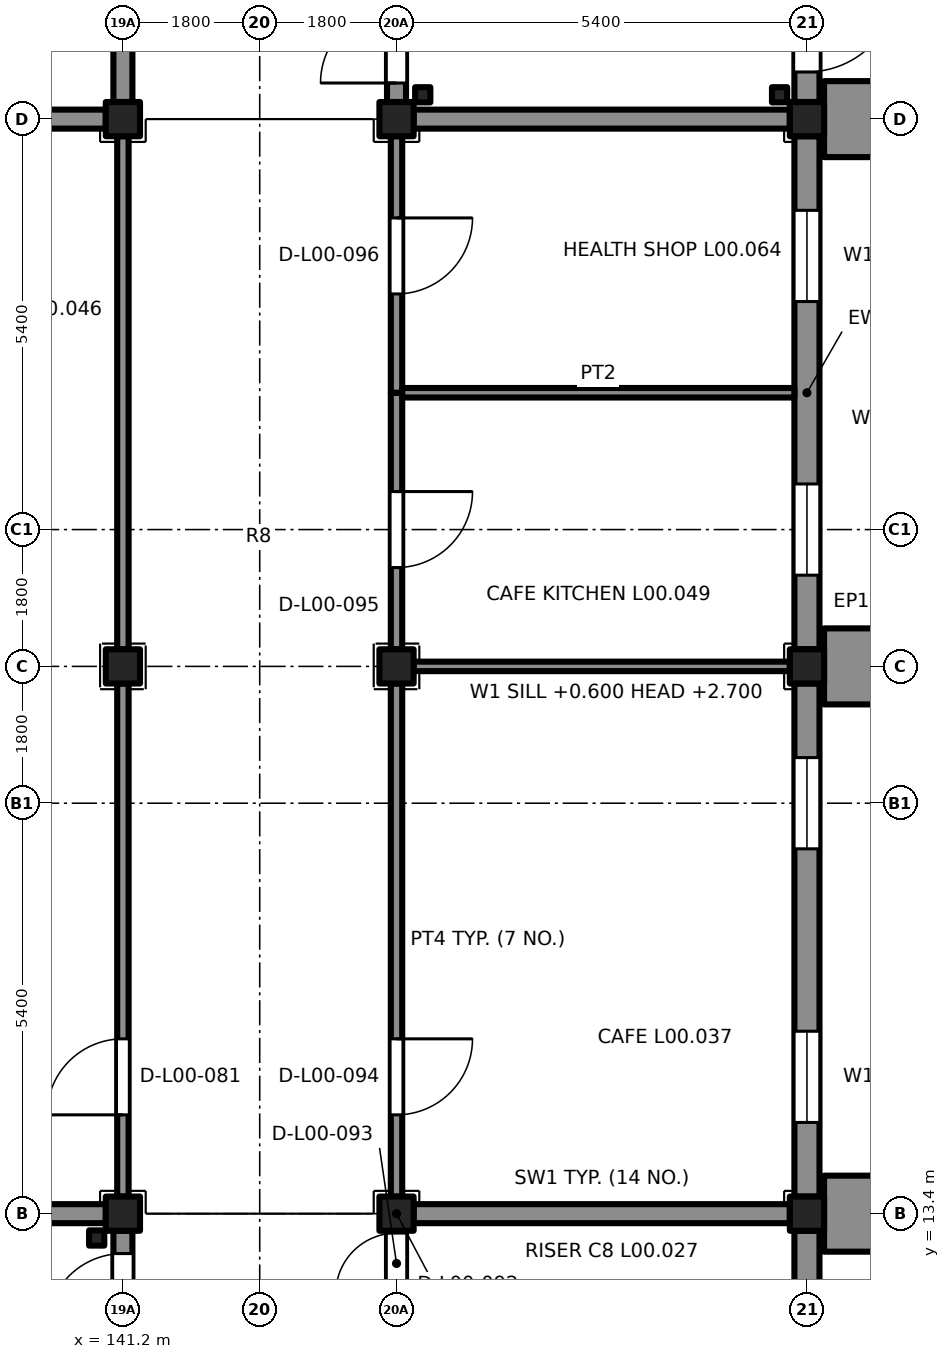
"""IFC4 building model, lengths in metres.
Left out: names, types, materials, properties, quantities, classifications, styles, units other than length and angle.
Written with IfcOpenShell. Run it as: python <this file> out.ifc"""

import sys

from ifc_helpers import new_model, si_unit, direction, frame, frame_2d, origin, origin_2d, place, context, subcontext, project, spatial, rectangle, extrude, element, fill, save


model = new_model("IFC4")
c1 = context("Model", 3, precision=1e-05, world=origin(), true_north=direction((0.0, 1.0)))
c2 = subcontext(c1, "Body", "Model", "MODEL_VIEW")
j1 = project(units=[si_unit("LENGTHUNIT", "METRE"), si_unit("PLANEANGLEUNIT", "RADIAN")], contexts=[c1])
p1 = place(None, origin())
s1 = spatial("IfcSite", under=j1, at=p1, CompositionType="ELEMENT")
p2 = place(p1, origin())
s2 = spatial("IfcBuilding", under=s1, at=p2, CompositionType="ELEMENT")
p3 = place(p2, origin())
s3 = spatial("IfcBuildingStorey", under=s2, at=p3, CompositionType="ELEMENT", Elevation=0.0)
for number, where, z_axis, x_axis in (
    (1, (141.2, 13.4, -0.2), (0.0, 0.0, 1.0), (1.0, 0.0, 0.0)),
    (2, (141.2, 20.6, -0.2), (0.0, 0.0, 1.0), (1.0, 0.0, 0.0)),
    (3, (141.2, 27.8, -0.2), (0.0, 0.0, 1.0), (1.0, 0.0, 0.0)),
    (4, (144.8, 13.4, -0.2), (0.0, 0.0, 1.0), (1.0, 0.0, 0.0)),
    (5, (144.8, 20.6, -0.2), (0.0, 0.0, 1.0), (1.0, 0.0, 0.0)),
    (6, (144.8, 27.8, -0.2), (0.0, 0.0, 1.0), (1.0, 0.0, 0.0)),
    (7, (150.2, 13.4, -0.2), (0.0, 0.0, 1.0), (1.0, 0.0, 0.0)),
    (8, (150.2, 20.6, -0.2), (0.0, 0.0, 1.0), (1.0, 0.0, 0.0)),
    (9, (150.2, 27.8, -0.2), (0.0, 0.0, 1.0), (1.0, 0.0, 0.0)),
):
    element("IfcColumn", number, at=place(p3, frame(where, z_axis=z_axis, x_axis=x_axis)), inside=s3, PredefinedType="COLUMN", context=c2, shape_type="SweptSolid", body=[
        extrude(rectangle(XDim=0.45, YDim=0.45, at=origin_2d()), origin(), (0.0, 0.0, 1.0), 5.55),
    ])
p4 = place(p3, frame((141.2, 6.365, 0.0), z_axis=(0.0, 0.0, 1.0), x_axis=(0.0, 1.0, 0.0)))
e10 = element("IfcWall", 10, at=p4, inside=s3, PredefinedType="SHEAR", context=c2, shape_type="SweptSolid", body=[
    extrude(rectangle(XDim=6.81, YDim=0.25, at=frame_2d((3.405, 0.0))), origin(), (0.0, 0.0, 1.0), 6.05),
])
p5 = place(p4, frame((5.51, 0.0, 0.0)))
e11 = element("IfcOpeningElement", 11, at=p5, cuts=e10, PredefinedType="OPENING", context=c2, shape_type="SweptSolid", body=[
    extrude(rectangle(XDim=1.0, YDim=2.1, at=frame_2d((0.5, 1.05))), frame((0.0, 0.135, 0.0), z_axis=(0.0, -1.0, 0.0), x_axis=(1.0, 0.0, 0.0)), (0.0, 0.0, 1.0), 0.27),
])
p6 = place(p3, frame((136.025, 13.4, 0.0), z_axis=(0.0, 0.0, 1.0), x_axis=(1.0, 0.0, 0.0)))
e12 = element("IfcWall", 12, at=p6, inside=s3, PredefinedType="SHEAR", context=c2, shape_type="SweptSolid", body=[
    extrude(rectangle(XDim=4.95, YDim=0.25, at=frame_2d((2.475, 0.0))), origin(), (0.0, 0.0, 1.0), 6.05),
])
p7 = place(p3, frame((144.8, 6.365, 0.0), z_axis=(0.0, 0.0, 1.0), x_axis=(0.0, 1.0, 0.0)))
e13 = element("IfcWall", 13, at=p7, inside=s3, PredefinedType="SHEAR", context=c2, shape_type="SweptSolid", body=[
    extrude(rectangle(XDim=6.81, YDim=0.25, at=frame_2d((3.405, 0.0))), origin(), (0.0, 0.0, 1.0), 6.05),
])
p8 = place(p7, frame((0.75, 0.0, 0.0)))
e14 = element("IfcOpeningElement", 14, at=p8, cuts=e13, PredefinedType="OPENING", context=c2, shape_type="SweptSolid", body=[
    extrude(rectangle(XDim=1.0, YDim=2.1, at=frame_2d((0.5, 1.05))), frame((0.0, 0.135, 0.0), z_axis=(0.0, -1.0, 0.0), x_axis=(1.0, 0.0, 0.0)), (0.0, 0.0, 1.0), 0.27),
])
p9 = place(p7, frame((3.15, 0.0, 0.0)))
e15 = element("IfcOpeningElement", 15, at=p9, cuts=e13, PredefinedType="OPENING", context=c2, shape_type="SweptSolid", body=[
    extrude(rectangle(XDim=0.9, YDim=2.1, at=frame_2d((0.45, 1.05))), frame((0.0, 0.135, 0.0), z_axis=(0.0, -1.0, 0.0), x_axis=(1.0, 0.0, 0.0)), (0.0, 0.0, 1.0), 0.27),
])
p10 = place(p7, frame((4.8, 0.0, 0.0)))
e16 = element("IfcOpeningElement", 16, at=p10, cuts=e13, PredefinedType="OPENING", context=c2, shape_type="SweptSolid", body=[
    extrude(rectangle(XDim=0.8, YDim=2.1, at=frame_2d((0.4, 1.05))), frame((0.0, 0.135, 0.0), z_axis=(0.0, -1.0, 0.0), x_axis=(1.0, 0.0, 0.0)), (0.0, 0.0, 1.0), 0.27),
])
p11 = place(p7, frame((5.98, 0.0, 0.0)))
e17 = element("IfcOpeningElement", 17, at=p11, cuts=e13, PredefinedType="OPENING", context=c2, shape_type="SweptSolid", body=[
    extrude(rectangle(XDim=0.8, YDim=2.1, at=frame_2d((0.4, 1.05))), frame((0.0, 0.135, 0.0), z_axis=(0.0, -1.0, 0.0), x_axis=(1.0, 0.0, 0.0)), (0.0, 0.0, 1.0), 0.27),
])
p12 = place(p3, frame((145.025, 13.4, 0.0), z_axis=(0.0, 0.0, 1.0), x_axis=(1.0, 0.0, 0.0)))
e18 = element("IfcWall", 18, at=p12, inside=s3, PredefinedType="SHEAR", context=c2, shape_type="SweptSolid", body=[
    extrude(rectangle(XDim=4.95, YDim=0.25, at=frame_2d((2.475, 0.0))), origin(), (0.0, 0.0, 1.0), 6.05),
])
p13 = place(p3, frame((140.855, 13.08, 0.0), z_axis=(0.0, 0.0, 1.0), x_axis=(1.0, 0.0, 0.0)))
e19 = element("IfcColumn", 19, at=p13, inside=s3, PredefinedType="COLUMN", context=c2, shape_type="SweptSolid", body=[
    extrude(rectangle(XDim=0.2, YDim=0.2, at=origin_2d()), origin(), (0.0, 0.0, 1.0), 2.95),
])
p14 = place(p3, frame((144.8, 28.025, 0.0), z_axis=(0.0, 0.0, 1.0), x_axis=(0.0, 1.0, 0.0)))
e20 = element("IfcWall", 20, at=p14, inside=s3, PredefinedType="SHEAR", context=c2, shape_type="SweptSolid", body=[
    extrude(rectangle(XDim=6.75, YDim=0.25, at=frame_2d((3.375, 0.0))), origin(), (0.0, 0.0, 1.0), 6.05),
])
p15 = place(p14, frame((0.25, 0.0, 0.0)))
e21 = element("IfcOpeningElement", 21, at=p15, cuts=e20, PredefinedType="OPENING", context=c2, shape_type="SweptSolid", body=[
    extrude(rectangle(XDim=1.0, YDim=2.1, at=frame_2d((0.5, 1.05))), frame((0.0, 0.135, 0.0), z_axis=(0.0, -1.0, 0.0), x_axis=(1.0, 0.0, 0.0)), (0.0, 0.0, 1.0), 0.27),
])
p16 = place(p3, frame((145.025, 27.8, 0.0), z_axis=(0.0, 0.0, 1.0), x_axis=(1.0, 0.0, 0.0)))
e22 = element("IfcWall", 22, at=p16, inside=s3, PredefinedType="SHEAR", context=c2, shape_type="SweptSolid", body=[
    extrude(rectangle(XDim=4.95, YDim=0.25, at=frame_2d((2.475, 0.0))), origin(), (0.0, 0.0, 1.0), 6.05),
])
p17 = place(p3, frame((141.2, 28.025, -1.4), z_axis=(0.0, 0.0, 1.0), x_axis=(0.0, 1.0, 0.0)))
e23 = element("IfcWall", 23, at=p17, inside=s3, PredefinedType="SHEAR", context=c2, shape_type="SweptSolid", body=[
    extrude(rectangle(XDim=6.75, YDim=0.25, at=frame_2d((3.375, 0.0))), origin(), (0.0, 0.0, 1.0), 7.45),
])
p18 = place(p17, frame((4.075, 0.0, 1.4)))
e24 = element("IfcOpeningElement", 24, at=p18, cuts=e23, PredefinedType="OPENING", context=c2, shape_type="SweptSolid", body=[
    extrude(rectangle(XDim=1.8, YDim=2.1, at=frame_2d((0.9, 1.05))), frame((0.0, 0.135, 0.0), z_axis=(0.0, -1.0, 0.0), x_axis=(1.0, 0.0, 0.0)), (0.0, 0.0, 1.0), 0.27),
])
p19 = place(p3, frame((136.025, 27.8, -1.4), z_axis=(0.0, 0.0, 1.0), x_axis=(1.0, 0.0, 0.0)))
e25 = element("IfcWall", 25, at=p19, inside=s3, PredefinedType="SHEAR", context=c2, shape_type="SweptSolid", body=[
    extrude(rectangle(XDim=4.95, YDim=0.25, at=frame_2d((2.475, 0.0))), origin(), (0.0, 0.0, 1.0), 7.45),
])
for number, where, z_axis, x_axis in (
    (26, (145.145, 28.12, 0.0), (0.0, 0.0, 1.0), (1.0, 0.0, 0.0)),
    (27, (149.84, 28.12, 0.0), (0.0, 0.0, 1.0), (1.0, 0.0, 0.0)),
):
    element("IfcColumn", number, at=place(p3, frame(where, z_axis=z_axis, x_axis=x_axis)), inside=s3, PredefinedType="COLUMN", context=c2, shape_type="SweptSolid", body=[
        extrude(rectangle(XDim=0.2, YDim=0.2, at=origin_2d()), origin(), (0.0, 0.0, 1.0), 2.95),
    ])
p20 = place(p3, frame((150.2, 13.175, 0.0), z_axis=(0.0, 0.0, 1.0), x_axis=(0.0, -1.0, 0.0)))
e28 = element("IfcWall", 28, at=p20, inside=s3, PredefinedType="SOLIDWALL", context=c2, shape_type="SweptSolid", body=[
    extrude(rectangle(XDim=5.444, YDim=0.33, at=frame_2d((2.722, 0.0))), origin(), (0.0, 0.0, 1.0), 5.35),
])
p21 = place(p3, frame((150.2, 20.375, 0.0), z_axis=(0.0, 0.0, 1.0), x_axis=(0.0, -1.0, 0.0)))
e29 = element("IfcWall", 29, at=p21, inside=s3, PredefinedType="SOLIDWALL", context=c2, shape_type="SweptSolid", body=[
    extrude(rectangle(XDim=6.75, YDim=0.33, at=frame_2d((3.375, 0.0))), origin(), (0.0, 0.0, 1.0), 5.35),
])
p22 = place(p21, frame((4.575, 0.0, 0.6)))
e30 = element("IfcOpeningElement", 30, at=p22, cuts=e29, PredefinedType="OPENING", context=c2, shape_type="SweptSolid", body=[
    extrude(rectangle(XDim=1.2, YDim=2.1, at=frame_2d((0.6, 1.05))), frame((0.0, 0.175, 0.0), z_axis=(0.0, -1.0, 0.0), x_axis=(1.0, 0.0, 0.0)), (0.0, 0.0, 1.0), 0.35),
])
p23 = place(p21, frame((0.975, 0.0, 0.6)))
e31 = element("IfcOpeningElement", 31, at=p23, cuts=e29, PredefinedType="OPENING", context=c2, shape_type="SweptSolid", body=[
    extrude(rectangle(XDim=1.2, YDim=2.1, at=frame_2d((0.6, 1.05))), frame((0.0, 0.175, 0.0), z_axis=(0.0, -1.0, 0.0), x_axis=(1.0, 0.0, 0.0)), (0.0, 0.0, 1.0), 0.35),
])
p24 = place(p3, frame((150.2, 27.575, 0.0), z_axis=(0.0, 0.0, 1.0), x_axis=(0.0, -1.0, 0.0)))
e32 = element("IfcWall", 32, at=p24, inside=s3, PredefinedType="SOLIDWALL", context=c2, shape_type="SweptSolid", body=[
    extrude(rectangle(XDim=6.75, YDim=0.33, at=frame_2d((3.375, 0.0))), origin(), (0.0, 0.0, 1.0), 5.35),
])
p25 = place(p24, frame((4.575, 0.0, 0.6)))
e33 = element("IfcOpeningElement", 33, at=p25, cuts=e32, PredefinedType="OPENING", context=c2, shape_type="SweptSolid", body=[
    extrude(rectangle(XDim=1.2, YDim=2.1, at=frame_2d((0.6, 1.05))), frame((0.0, 0.175, 0.0), z_axis=(0.0, -1.0, 0.0), x_axis=(1.0, 0.0, 0.0)), (0.0, 0.0, 1.0), 0.35),
])
p26 = place(p24, frame((0.975, 0.0, 0.6)))
e34 = element("IfcOpeningElement", 34, at=p26, cuts=e32, PredefinedType="OPENING", context=c2, shape_type="SweptSolid", body=[
    extrude(rectangle(XDim=1.2, YDim=2.1, at=frame_2d((0.6, 1.05))), frame((0.0, 0.175, 0.0), z_axis=(0.0, -1.0, 0.0), x_axis=(1.0, 0.0, 0.0)), (0.0, 0.0, 1.0), 0.35),
])
p27 = place(p3, frame((150.2, 30.7, 0.0), z_axis=(0.0, 0.0, 1.0), x_axis=(0.0, -1.0, 0.0)))
e35 = element("IfcWall", 35, at=p27, inside=s3, PredefinedType="SOLIDWALL", context=c2, shape_type="SweptSolid", body=[
    extrude(rectangle(XDim=2.675, YDim=0.33, at=frame_2d((1.337, 0.0))), origin(), (0.0, 0.0, 1.0), 5.35),
])
p28 = place(p27, frame((1.08, 0.0, 0.0)))
e36 = element("IfcOpeningElement", 36, at=p28, cuts=e35, PredefinedType="OPENING", context=c2, shape_type="SweptSolid", body=[
    extrude(rectangle(XDim=1.2, YDim=2.1, at=frame_2d((0.6, 1.05))), frame((0.0, 0.175, 0.0), z_axis=(0.0, -1.0, 0.0), x_axis=(1.0, 0.0, 0.0)), (0.0, 0.0, 1.0), 0.35),
])
for number, where, z_axis, x_axis in (
    (37, (150.8, 13.9, 0.0), (0.0, 0.0, 1.0), (0.0, -1.0, 0.0)),
    (38, (150.8, 21.1, 0.0), (0.0, 0.0, 1.0), (0.0, -1.0, 0.0)),
    (39, (150.8, 28.3, 0.0), (0.0, 0.0, 1.0), (0.0, -1.0, 0.0)),
):
    element("IfcWall", number, at=place(p3, frame(where, z_axis=z_axis, x_axis=x_axis)), inside=s3, PredefinedType="SOLIDWALL", context=c2, shape_type="SweptSolid", body=[
        extrude(rectangle(XDim=1.0, YDim=0.75, at=frame_2d((0.5, 0.0))), origin(), (0.0, 0.0, 1.0), 6.3),
    ])
p29 = place(p3, frame((141.2, 13.625, 0.0), z_axis=(0.0, 0.0, 1.0), x_axis=(0.0, 1.0, 0.0)))
e40 = element("IfcWall", 40, at=p29, inside=s3, PredefinedType="PARTITIONING", context=c2, shape_type="SweptSolid", body=[
    extrude(rectangle(XDim=6.75, YDim=0.15, at=frame_2d((3.375, 0.0))), origin(), (0.0, 0.0, 1.0), 5.35),
])
p30 = place(p29, frame((1.075, 0.0, 0.0)))
e41 = element("IfcOpeningElement", 41, at=p30, cuts=e40, PredefinedType="OPENING", context=c2, shape_type="SweptSolid", body=[
    extrude(rectangle(XDim=1.0, YDim=2.1, at=frame_2d((0.5, 1.05))), frame((0.0, 0.085, 0.0), z_axis=(0.0, -1.0, 0.0), x_axis=(1.0, 0.0, 0.0)), (0.0, 0.0, 1.0), 0.17),
])
p31 = place(p3, frame((141.2, 20.825, 0.0), z_axis=(0.0, 0.0, 1.0), x_axis=(0.0, 1.0, 0.0)))
e42 = element("IfcWall", 42, at=p31, inside=s3, PredefinedType="PARTITIONING", context=c2, shape_type="SweptSolid", body=[
    extrude(rectangle(XDim=6.75, YDim=0.15, at=frame_2d((3.375, 0.0))), origin(), (0.0, 0.0, 1.0), 5.35),
])
p32 = place(p3, frame((144.8, 20.375, 0.0), z_axis=(0.0, 0.0, 1.0), x_axis=(0.0, -1.0, 0.0)))
e43 = element("IfcWall", 43, at=p32, inside=s3, PredefinedType="PARTITIONING", context=c2, shape_type="SweptSolid", body=[
    extrude(rectangle(XDim=6.75, YDim=0.15, at=frame_2d((3.375, 0.0))), origin(), (0.0, 0.0, 1.0), 5.35),
])
p33 = place(p32, frame((4.675, 0.0, 0.0)))
e44 = element("IfcOpeningElement", 44, at=p33, cuts=e43, PredefinedType="OPENING", context=c2, shape_type="SweptSolid", body=[
    extrude(rectangle(XDim=1.0, YDim=2.1, at=frame_2d((0.5, 1.05))), frame((0.0, 0.085, 0.0), z_axis=(0.0, -1.0, 0.0), x_axis=(1.0, 0.0, 0.0)), (0.0, 0.0, 1.0), 0.17),
])
p34 = place(p3, frame((144.8, 24.2, 0.0), z_axis=(0.0, 0.0, 1.0), x_axis=(0.0, -1.0, 0.0)))
e45 = element("IfcWall", 45, at=p34, inside=s3, PredefinedType="PARTITIONING", context=c2, shape_type="SweptSolid", body=[
    extrude(rectangle(XDim=3.375, YDim=0.15, at=frame_2d((1.688, 0.0))), origin(), (0.0, 0.0, 1.0), 5.35),
])
p35 = place(p34, frame((1.3, 0.0, 0.0)))
e46 = element("IfcOpeningElement", 46, at=p35, cuts=e45, PredefinedType="OPENING", context=c2, shape_type="SweptSolid", body=[
    extrude(rectangle(XDim=1.0, YDim=2.1, at=frame_2d((0.5, 1.05))), frame((0.0, 0.085, 0.0), z_axis=(0.0, -1.0, 0.0), x_axis=(1.0, 0.0, 0.0)), (0.0, 0.0, 1.0), 0.17),
])
p36 = place(p3, frame((149.975, 20.6, 0.0), z_axis=(0.0, 0.0, 1.0), x_axis=(-1.0, 0.0, 0.0)))
e47 = element("IfcWall", 47, at=p36, inside=s3, PredefinedType="PARTITIONING", context=c2, shape_type="SweptSolid", body=[
    extrude(rectangle(XDim=4.95, YDim=0.125, at=frame_2d((2.475, 0.0))), origin(), (0.0, 0.0, 1.0), 6.05),
])
p37 = place(p3, frame((144.8, 27.575, 0.0), z_axis=(0.0, 0.0, 1.0), x_axis=(0.0, -1.0, 0.0)))
e48 = element("IfcWall", 48, at=p37, inside=s3, PredefinedType="PARTITIONING", context=c2, shape_type="SweptSolid", body=[
    extrude(rectangle(XDim=3.375, YDim=0.15, at=frame_2d((1.688, 0.0))), origin(), (0.0, 0.0, 1.0), 5.35),
])
p38 = place(p37, frame((1.075, 0.0, 0.0)))
e49 = element("IfcOpeningElement", 49, at=p38, cuts=e48, PredefinedType="OPENING", context=c2, shape_type="SweptSolid", body=[
    extrude(rectangle(XDim=1.0, YDim=2.1, at=frame_2d((0.5, 1.05))), frame((0.0, 0.085, 0.0), z_axis=(0.0, -1.0, 0.0), x_axis=(1.0, 0.0, 0.0)), (0.0, 0.0, 1.0), 0.17),
])
p39 = place(p3, frame((150.035, 24.2, 0.0), z_axis=(0.0, 0.0, 1.0), x_axis=(-1.0, 0.0, 0.0)))
e50 = element("IfcWall", 50, at=p39, inside=s3, PredefinedType="PARTITIONING", context=c2, shape_type="SweptSolid", body=[
    extrude(rectangle(XDim=5.16, YDim=0.125, at=frame_2d((2.58, 0.0))), origin(), (0.0, 0.0, 1.0), 6.05),
])
p40 = place(p5, origin())
e51 = element("IfcDoor", 51, at=p40, inside=s3, OperationType="SINGLE_SWING_RIGHT", PredefinedType="DOOR", context=c2, shape_type="SweptSolid", body=[
    extrude(rectangle(XDim=1.0, YDim=2.1, at=frame_2d((0.5, 1.05))), frame((0.0, 0.025, 0.0), z_axis=(0.0, -1.0, 0.0), x_axis=(1.0, 0.0, 0.0)), (0.0, 0.0, 1.0), 0.05),
])
fill(e11, e51)
p41 = place(p11, origin())
e52 = element("IfcDoor", 52, at=p41, inside=s3, OperationType="SINGLE_SWING_LEFT", PredefinedType="DOOR", context=c2, shape_type="SweptSolid", body=[
    extrude(rectangle(XDim=0.8, YDim=2.1, at=frame_2d((0.4, 1.05))), frame((0.0, 0.025, 0.0), z_axis=(0.0, -1.0, 0.0), x_axis=(1.0, 0.0, 0.0)), (0.0, 0.0, 1.0), 0.05),
])
fill(e17, e52)
p42 = place(p15, origin())
e53 = element("IfcDoor", 53, at=p42, inside=s3, OperationType="SINGLE_SWING_LEFT", PredefinedType="DOOR", context=c2, shape_type="SweptSolid", body=[
    extrude(rectangle(XDim=1.0, YDim=2.1, at=frame_2d((0.5, 1.05))), frame((0.0, 0.025, 0.0), z_axis=(0.0, -1.0, 0.0), x_axis=(1.0, 0.0, 0.0)), (0.0, 0.0, 1.0), 0.05),
])
fill(e21, e53)
p43 = place(p22, origin())
e54 = element("IfcWindow", 54, at=p43, inside=s3, PartitioningType="SINGLE_PANEL", PredefinedType="WINDOW", context=c2, shape_type="SweptSolid", body=[
    extrude(rectangle(XDim=1.2, YDim=2.1, at=frame_2d((0.6, 1.05))), frame((0.0, -0.03, 0.0), z_axis=(0.0, -1.0, 0.0), x_axis=(1.0, 0.0, 0.0)), (0.0, 0.0, 1.0), 0.06),
])
fill(e30, e54)
p44 = place(p23, origin())
e55 = element("IfcWindow", 55, at=p44, inside=s3, PartitioningType="SINGLE_PANEL", PredefinedType="WINDOW", context=c2, shape_type="SweptSolid", body=[
    extrude(rectangle(XDim=1.2, YDim=2.1, at=frame_2d((0.6, 1.05))), frame((0.0, -0.03, 0.0), z_axis=(0.0, -1.0, 0.0), x_axis=(1.0, 0.0, 0.0)), (0.0, 0.0, 1.0), 0.06),
])
fill(e31, e55)
p45 = place(p25, origin())
e56 = element("IfcWindow", 56, at=p45, inside=s3, PartitioningType="SINGLE_PANEL", PredefinedType="WINDOW", context=c2, shape_type="SweptSolid", body=[
    extrude(rectangle(XDim=1.2, YDim=2.1, at=frame_2d((0.6, 1.05))), frame((0.0, -0.03, 0.0), z_axis=(0.0, -1.0, 0.0), x_axis=(1.0, 0.0, 0.0)), (0.0, 0.0, 1.0), 0.06),
])
fill(e33, e56)
p46 = place(p26, origin())
e57 = element("IfcWindow", 57, at=p46, inside=s3, PartitioningType="SINGLE_PANEL", PredefinedType="WINDOW", context=c2, shape_type="SweptSolid", body=[
    extrude(rectangle(XDim=1.2, YDim=2.1, at=frame_2d((0.6, 1.05))), frame((0.0, -0.03, 0.0), z_axis=(0.0, -1.0, 0.0), x_axis=(1.0, 0.0, 0.0)), (0.0, 0.0, 1.0), 0.06),
])
fill(e34, e57)
p47 = place(p28, origin())
e58 = element("IfcDoor", 58, at=p47, inside=s3, OperationType="SINGLE_SWING_LEFT", PredefinedType="DOOR", context=c2, shape_type="SweptSolid", body=[
    extrude(rectangle(XDim=1.2, YDim=2.1, at=frame_2d((0.6, 1.05))), frame((0.0, 0.025, 0.0), z_axis=(0.0, -1.0, 0.0), x_axis=(1.0, 0.0, 0.0)), (0.0, 0.0, 1.0), 0.05),
])
fill(e36, e58)
p48 = place(p30, origin())
e59 = element("IfcDoor", 59, at=p48, inside=s3, OperationType="SINGLE_SWING_LEFT", PredefinedType="DOOR", context=c2, shape_type="SweptSolid", body=[
    extrude(rectangle(XDim=1.0, YDim=2.1, at=frame_2d((0.5, 1.05))), frame((0.0, 0.025, 0.0), z_axis=(0.0, -1.0, 0.0), x_axis=(1.0, 0.0, 0.0)), (0.0, 0.0, 1.0), 0.05),
])
fill(e41, e59)
p49 = place(p33, origin())
e60 = element("IfcDoor", 60, at=p49, inside=s3, OperationType="SINGLE_SWING_RIGHT", PredefinedType="DOOR", context=c2, shape_type="SweptSolid", body=[
    extrude(rectangle(XDim=1.0, YDim=2.1, at=frame_2d((0.5, 1.05))), frame((0.0, 0.025, 0.0), z_axis=(0.0, -1.0, 0.0), x_axis=(1.0, 0.0, 0.0)), (0.0, 0.0, 1.0), 0.05),
])
fill(e44, e60)
p50 = place(p35, origin())
e61 = element("IfcDoor", 61, at=p50, inside=s3, OperationType="SINGLE_SWING_RIGHT", PredefinedType="DOOR", context=c2, shape_type="SweptSolid", body=[
    extrude(rectangle(XDim=1.0, YDim=2.1, at=frame_2d((0.5, 1.05))), frame((0.0, 0.025, 0.0), z_axis=(0.0, -1.0, 0.0), x_axis=(1.0, 0.0, 0.0)), (0.0, 0.0, 1.0), 0.05),
])
fill(e46, e61)
p51 = place(p38, origin())
e62 = element("IfcDoor", 62, at=p51, inside=s3, OperationType="SINGLE_SWING_LEFT", PredefinedType="DOOR", context=c2, shape_type="SweptSolid", body=[
    extrude(rectangle(XDim=1.0, YDim=2.1, at=frame_2d((0.5, 1.05))), frame((0.0, 0.025, 0.0), z_axis=(0.0, -1.0, 0.0), x_axis=(1.0, 0.0, 0.0)), (0.0, 0.0, 1.0), 0.05),
])
fill(e49, e62)
save(model, sys.argv[1])
